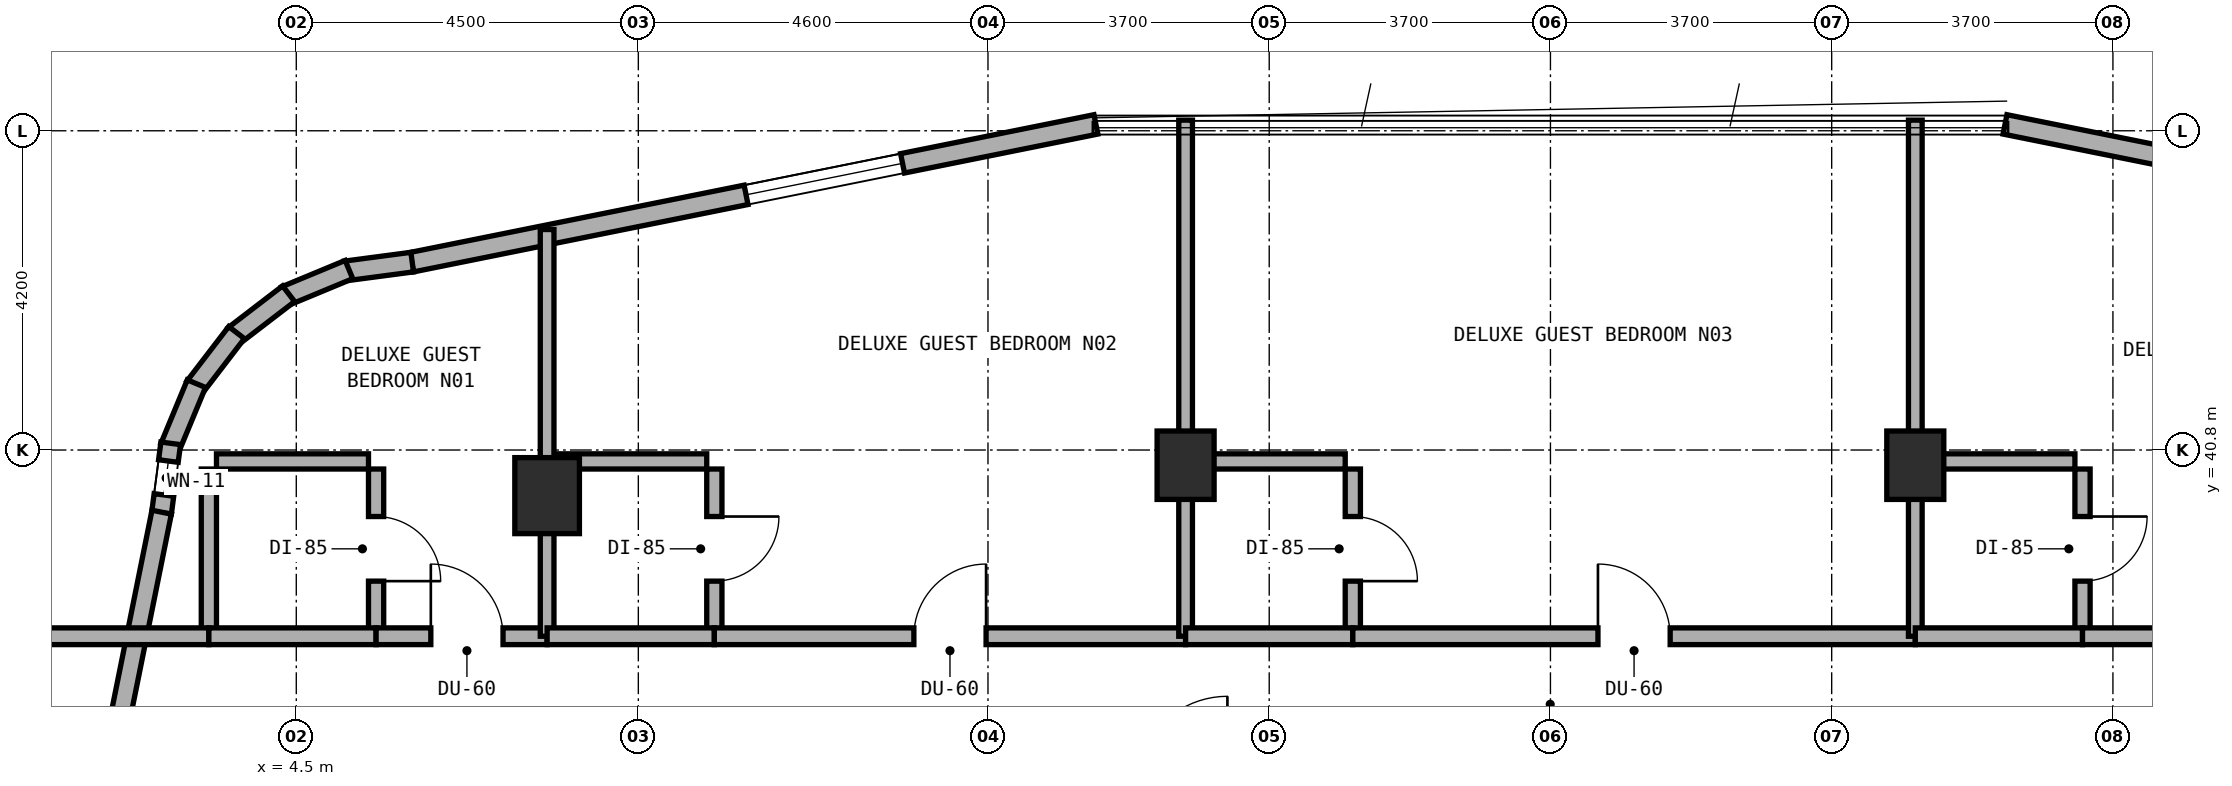
"""IFC4 building model, lengths in metres.
Left out: names, types, materials, properties, quantities, classifications, styles, units other than length and angle.
Written with IfcOpenShell. Run it as: python <this file> out.ifc"""

import sys

from ifc_helpers import new_model, si_unit, direction, frame, frame_2d, origin, origin_2d, place, context, subcontext, project, spatial, rectangle, extrude, element, fill, save


model = new_model("IFC4")
c1 = context("Model", 3, precision=1e-05, world=origin(), true_north=direction((0.0, 1.0)))
c2 = subcontext(c1, "Body", "Model", "MODEL_VIEW")
j1 = project(units=[si_unit("LENGTHUNIT", "METRE"), si_unit("PLANEANGLEUNIT", "RADIAN")], contexts=[c1])
p1 = place(None, origin())
s1 = spatial("IfcSite", under=j1, at=p1, CompositionType="ELEMENT")
p2 = place(p1, origin())
s2 = spatial("IfcBuilding", under=s1, at=p2, CompositionType="ELEMENT")
p3 = place(p2, frame((0.0, 0.0, 152.0)))
s3 = spatial("IfcBuildingStorey", under=s2, at=p3, CompositionType="ELEMENT", Elevation=152.0)
for number, where, z_axis, x_axis in (
    (1, (16.2, 40.6, 0.0), (0.0, 0.0, 1.0), (1.0, 0.0, 0.0)),
    (2, (25.8, 40.6, 0.0), (0.0, 0.0, 1.0), (1.0, 0.0, 0.0)),
):
    element("IfcColumn", number, at=place(p3, frame(where, z_axis=z_axis, x_axis=x_axis)), inside=s3, PredefinedType="COLUMN", context=c2, shape_type="SweptSolid", body=[
        extrude(rectangle(XDim=0.75, YDim=0.9, at=origin_2d()), origin(), (0.0, 0.0, 1.0), 3.5),
    ])
p4 = place(p3, frame((7.8, 40.2, 0.0), z_axis=(0.0, 0.0, 1.0), x_axis=(1.0, 0.0, 0.0)))
e3 = element("IfcColumn", 3, at=p4, inside=s3, PredefinedType="COLUMN", context=c2, shape_type="SweptSolid", body=[
    extrude(rectangle(XDim=0.85, YDim=1.0, at=origin_2d()), origin(), (0.0, 0.0, 1.0), 3.5),
])
p5 = place(p3, frame((35.982, 43.271, 0.0), z_axis=(0.0, 0.0, 1.0), x_axis=(-0.980315963543, 0.197435082048, 0.0)))
e4 = element("IfcWall", 4, at=p5, inside=s3, PredefinedType="STANDARD", context=c2, shape_type="SweptSolid", body=[
    extrude(rectangle(XDim=9.183, YDim=0.26, at=frame_2d((4.591, 0.0))), origin(), (0.0, 0.0, 1.0), 3.22),
])
p6 = place(p5, frame((4.487, 0.0, 0.85)))
e5 = element("IfcOpeningElement", 5, at=p6, cuts=e4, PredefinedType="OPENING", context=c2, shape_type="SweptSolid", body=[
    extrude(rectangle(XDim=2.1, YDim=1.5, at=frame_2d((1.05, 0.75))), frame((0.0, 0.14, 0.0), z_axis=(0.0, -1.0, 0.0), x_axis=(1.0, 0.0, 0.0)), (0.0, 0.0, 1.0), 0.28),
])
p7 = place(p3, frame((15.02, 45.084, 0.0), z_axis=(0.0, 0.0, 1.0), x_axis=(-0.980315963543, -0.197435082048, 0.0)))
e6 = element("IfcWall", 6, at=p7, inside=s3, PredefinedType="STANDARD", context=c2, shape_type="SweptSolid", body=[
    extrude(rectangle(XDim=9.183, YDim=0.26, at=frame_2d((4.591, 0.0))), origin(), (0.0, 0.0, 1.0), 3.22),
])
p8 = place(p7, frame((2.595, 0.0, 0.85)))
e7 = element("IfcOpeningElement", 7, at=p8, cuts=e6, PredefinedType="OPENING", context=c2, shape_type="SweptSolid", body=[
    extrude(rectangle(XDim=2.1, YDim=1.5, at=frame_2d((1.05, 0.75))), frame((0.0, 0.14, 0.0), z_axis=(0.0, -1.0, 0.0), x_axis=(1.0, 0.0, 0.0)), (0.0, 0.0, 1.0), 0.28),
])
p9 = place(p3, frame((6.025, 43.272, 0.0), z_axis=(0.0, 0.0, 1.0), x_axis=(-0.991388484223, -0.130953706898, 0.0)))
e8 = element("IfcWall", 8, at=p9, inside=s3, PredefinedType="STANDARD", context=c2, shape_type="SweptSolid", body=[
    extrude(rectangle(XDim=0.885, YDim=0.26, at=frame_2d((0.443, 0.0))), origin(), (0.0, 0.0, 1.0), 3.22),
])
p10 = place(p3, frame((5.193, 43.174, 0.0), z_axis=(0.0, 0.0, 1.0), x_axis=(-0.923627776508, -0.383290660547, 0.0)))
e9 = element("IfcWall", 9, at=p10, inside=s3, PredefinedType="STANDARD", context=c2, shape_type="SweptSolid", body=[
    extrude(rectangle(XDim=0.903, YDim=0.26, at=frame_2d((0.452, 0.0))), origin(), (0.0, 0.0, 1.0), 3.22),
])
p11 = place(p3, frame((4.399, 42.856, 0.0), z_axis=(0.0, 0.0, 1.0), x_axis=(-0.793458244748, -0.608624690463, 0.0)))
e10 = element("IfcWall", 10, at=p11, inside=s3, PredefinedType="STANDARD", context=c2, shape_type="SweptSolid", body=[
    extrude(rectangle(XDim=0.902, YDim=0.26, at=frame_2d((0.451, 0.0))), origin(), (0.0, 0.0, 1.0), 3.22),
])
p12 = place(p3, frame((3.714, 42.345, 0.0), z_axis=(0.0, 0.0, 1.0), x_axis=(-0.608494022858, -0.793558456666, 0.0)))
e11 = element("IfcWall", 11, at=p12, inside=s3, PredefinedType="STANDARD", context=c2, shape_type="SweptSolid", body=[
    extrude(rectangle(XDim=0.902, YDim=0.26, at=frame_2d((0.451, 0.0))), origin(), (0.0, 0.0, 1.0), 3.22),
])
p13 = place(p3, frame((3.186, 41.673, 0.0), z_axis=(0.0, 0.0, 1.0), x_axis=(-0.383155708213, -0.923683767999, 0.0)))
e12 = element("IfcWall", 12, at=p13, inside=s3, PredefinedType="STANDARD", context=c2, shape_type="SweptSolid", body=[
    extrude(rectangle(XDim=0.903, YDim=0.26, at=frame_2d((0.451, 0.0))), origin(), (0.0, 0.0, 1.0), 3.22),
])
p14 = place(p3, frame((2.848, 40.888, 0.0), z_axis=(0.0, 0.0, 1.0), x_axis=(-0.130200706103, -0.991487658083, 0.0)))
e13 = element("IfcWall", 13, at=p14, inside=s3, PredefinedType="STANDARD", context=c2, shape_type="SweptSolid", body=[
    extrude(rectangle(XDim=0.921, YDim=0.26, at=frame_2d((0.46, 0.0))), origin(), (0.0, 0.0, 1.0), 3.22),
])
p15 = place(p14, frame((0.235, 0.0, 0.85)))
e14 = element("IfcOpeningElement", 14, at=p15, cuts=e13, PredefinedType="OPENING", context=c2, shape_type="SweptSolid", body=[
    extrude(rectangle(XDim=0.45, YDim=1.5, at=frame_2d((0.225, 0.75))), frame((0.0, 0.14, 0.0), z_axis=(0.0, -1.0, 0.0), x_axis=(1.0, 0.0, 0.0)), (0.0, 0.0, 1.0), 0.28),
])
p16 = place(p3, frame((2.729, 39.982, 0.0), z_axis=(0.0, 0.0, 1.0), x_axis=(-0.197435082048, -0.980315963543, 0.0)))
e15 = element("IfcWall", 15, at=p16, inside=s3, PredefinedType="STANDARD", context=c2, shape_type="SweptSolid", body=[
    extrude(rectangle(XDim=9.183, YDim=0.26, at=frame_2d((4.591, 0.0))), origin(), (0.0, 0.0, 1.0), 3.22),
])
p17 = place(p16, frame((4.436, 0.0, 0.85)))
e16 = element("IfcOpeningElement", 16, at=p17, cuts=e15, PredefinedType="OPENING", context=c2, shape_type="SweptSolid", body=[
    extrude(rectangle(XDim=2.1, YDim=1.5, at=frame_2d((1.05, 0.75))), frame((0.0, 0.14, 0.0), z_axis=(0.0, -1.0, 0.0), x_axis=(1.0, 0.0, 0.0)), (0.0, 0.0, 1.0), 0.28),
])
p18 = place(p3, frame((5.55, 38.45, 0.0), z_axis=(0.0, 0.0, 1.0), x_axis=(0.0, 1.0, 0.0)))
e17 = element("IfcWall", 17, at=p18, inside=s3, PredefinedType="PLUMBINGWALL", context=c2, shape_type="SweptSolid", body=[
    extrude(rectangle(XDim=2.1, YDim=0.2, at=frame_2d((1.05, 0.0))), origin(), (0.0, 0.0, 1.0), 3.22),
])
p19 = place(p18, frame((0.625, 0.0, 0.0)))
e18 = element("IfcOpeningElement", 18, at=p19, cuts=e17, PredefinedType="OPENING", context=c2, shape_type="SweptSolid", body=[
    extrude(rectangle(XDim=0.85, YDim=2.1, at=frame_2d((0.425, 1.05))), frame((0.0, 0.11, 0.0), z_axis=(0.0, -1.0, 0.0), x_axis=(1.0, 0.0, 0.0)), (0.0, 0.0, 1.0), 0.22),
])
p20 = place(p3, frame((3.45, 40.65, 0.0), z_axis=(0.0, 0.0, 1.0), x_axis=(1.0, 0.0, 0.0)))
e19 = element("IfcWall", 19, at=p20, inside=s3, PredefinedType="PLUMBINGWALL", context=c2, shape_type="SweptSolid", body=[
    extrude(rectangle(XDim=2.0, YDim=0.2, at=frame_2d((1.0, 0.0))), origin(), (0.0, 0.0, 1.0), 3.22),
])
p21 = place(p3, frame((3.35, 38.45, 0.0), z_axis=(0.0, 0.0, 1.0), x_axis=(0.0, 1.0, 0.0)))
e20 = element("IfcWall", 20, at=p21, inside=s3, PredefinedType="PLUMBINGWALL", context=c2, shape_type="SweptSolid", body=[
    extrude(rectangle(XDim=2.1, YDim=0.2, at=frame_2d((1.05, 0.0))), origin(), (0.0, 0.0, 1.0), 3.22),
])
p22 = place(p3, frame((0.96, 38.35, 0.0), z_axis=(0.0, 0.0, 1.0), x_axis=(1.0, 0.0, 0.0)))
e21 = element("IfcWall", 21, at=p22, inside=s3, PredefinedType="SOLIDWALL", context=c2, shape_type="SweptSolid", body=[
    extrude(rectangle(XDim=2.39, YDim=0.22, at=frame_2d((1.195, 0.0))), origin(), (0.0, 0.0, 1.0), 3.22),
])
p23 = place(p3, frame((3.35, 38.35, 0.0), z_axis=(0.0, 0.0, 1.0), x_axis=(1.0, 0.0, 0.0)))
e22 = element("IfcWall", 22, at=p23, inside=s3, PredefinedType="SOLIDWALL", context=c2, shape_type="SweptSolid", body=[
    extrude(rectangle(XDim=2.2, YDim=0.22, at=frame_2d((1.1, 0.0))), origin(), (0.0, 0.0, 1.0), 3.22),
])
p24 = place(p3, frame((5.55, 38.35, 0.0), z_axis=(0.0, 0.0, 1.0), x_axis=(1.0, 0.0, 0.0)))
e23 = element("IfcWall", 23, at=p24, inside=s3, PredefinedType="SOLIDWALL", context=c2, shape_type="SweptSolid", body=[
    extrude(rectangle(XDim=2.25, YDim=0.22, at=frame_2d((1.125, 0.0))), origin(), (0.0, 0.0, 1.0), 2.795),
])
p25 = place(p24, frame((0.72, 0.0, 0.0)))
e24 = element("IfcOpeningElement", 24, at=p25, cuts=e23, PredefinedType="OPENING", context=c2, shape_type="SweptSolid", body=[
    extrude(rectangle(XDim=0.95, YDim=2.1, at=frame_2d((0.475, 1.05))), frame((0.0, 0.12, 0.0), z_axis=(0.0, -1.0, 0.0), x_axis=(1.0, 0.0, 0.0)), (0.0, 0.0, 1.0), 0.24),
])
p26 = place(p3, frame((7.8, 38.35, 0.0), z_axis=(0.0, 0.0, 1.0), x_axis=(0.0, 1.0, 0.0)))
e25 = element("IfcWall", 25, at=p26, inside=s3, PredefinedType="SOLIDWALL", context=c2, shape_type="SweptSolid", body=[
    extrude(rectangle(XDim=5.351, YDim=0.18, at=frame_2d((2.675, 0.0))), origin(), (0.0, 0.0, 1.0), 2.795),
])
p27 = place(p3, frame((10.0, 38.45, 0.0), z_axis=(0.0, 0.0, 1.0), x_axis=(0.0, 1.0, 0.0)))
e26 = element("IfcWall", 26, at=p27, inside=s3, PredefinedType="PLUMBINGWALL", context=c2, shape_type="SweptSolid", body=[
    extrude(rectangle(XDim=2.1, YDim=0.2, at=frame_2d((1.05, 0.0))), origin(), (0.0, 0.0, 1.0), 2.745),
])
p28 = place(p27, frame((0.625, 0.0, 0.0)))
e27 = element("IfcOpeningElement", 27, at=p28, cuts=e26, PredefinedType="OPENING", context=c2, shape_type="SweptSolid", body=[
    extrude(rectangle(XDim=0.85, YDim=2.1, at=frame_2d((0.425, 1.05))), frame((0.0, 0.11, 0.0), z_axis=(0.0, -1.0, 0.0), x_axis=(1.0, 0.0, 0.0)), (0.0, 0.0, 1.0), 0.22),
])
p29 = place(p3, frame((7.9, 40.65, 0.0), z_axis=(0.0, 0.0, 1.0), x_axis=(1.0, 0.0, 0.0)))
e28 = element("IfcWall", 28, at=p29, inside=s3, PredefinedType="PLUMBINGWALL", context=c2, shape_type="SweptSolid", body=[
    extrude(rectangle(XDim=2.0, YDim=0.2, at=frame_2d((1.0, 0.0))), origin(), (0.0, 0.0, 1.0), 3.22),
])
p30 = place(p3, frame((7.8, 38.35, 0.0), z_axis=(0.0, 0.0, 1.0), x_axis=(1.0, 0.0, 0.0)))
e29 = element("IfcWall", 29, at=p30, inside=s3, PredefinedType="SOLIDWALL", context=c2, shape_type="SweptSolid", body=[
    extrude(rectangle(XDim=2.2, YDim=0.22, at=frame_2d((1.1, 0.0))), origin(), (0.0, 0.0, 1.0), 2.795),
])
p31 = place(p3, frame((10.0, 38.35, 0.0), z_axis=(0.0, 0.0, 1.0), x_axis=(1.0, 0.0, 0.0)))
e30 = element("IfcWall", 30, at=p31, inside=s3, PredefinedType="SOLIDWALL", context=c2, shape_type="SweptSolid", body=[
    extrude(rectangle(XDim=6.2, YDim=0.22, at=frame_2d((3.1, 0.0))), origin(), (0.0, 0.0, 1.0), 2.795),
])
p32 = place(p31, frame((2.625, 0.0, 0.0)))
e31 = element("IfcOpeningElement", 31, at=p32, cuts=e30, PredefinedType="OPENING", context=c2, shape_type="SweptSolid", body=[
    extrude(rectangle(XDim=0.95, YDim=2.1, at=frame_2d((0.475, 1.05))), frame((0.0, 0.12, 0.0), z_axis=(0.0, -1.0, 0.0), x_axis=(1.0, 0.0, 0.0)), (0.0, 0.0, 1.0), 0.24),
])
p33 = place(p3, frame((16.2, 38.35, 0.0), z_axis=(0.0, 0.0, 1.0), x_axis=(0.0, 1.0, 0.0)))
e32 = element("IfcWall", 32, at=p33, inside=s3, PredefinedType="SOLIDWALL", context=c2, shape_type="SweptSolid", body=[
    extrude(rectangle(XDim=6.79, YDim=0.18, at=frame_2d((3.395, 0.0))), origin(), (0.0, 0.0, 1.0), 2.795),
])
p34 = place(p3, frame((18.4, 38.45, 0.0), z_axis=(0.0, 0.0, 1.0), x_axis=(0.0, 1.0, 0.0)))
e33 = element("IfcWall", 33, at=p34, inside=s3, PredefinedType="PLUMBINGWALL", context=c2, shape_type="SweptSolid", body=[
    extrude(rectangle(XDim=2.1, YDim=0.2, at=frame_2d((1.05, 0.0))), origin(), (0.0, 0.0, 1.0), 2.745),
])
p35 = place(p34, frame((0.625, 0.0, 0.0)))
e34 = element("IfcOpeningElement", 34, at=p35, cuts=e33, PredefinedType="OPENING", context=c2, shape_type="SweptSolid", body=[
    extrude(rectangle(XDim=0.85, YDim=2.1, at=frame_2d((0.425, 1.05))), frame((0.0, 0.11, 0.0), z_axis=(0.0, -1.0, 0.0), x_axis=(1.0, 0.0, 0.0)), (0.0, 0.0, 1.0), 0.22),
])
p36 = place(p3, frame((16.3, 40.65, 0.0), z_axis=(0.0, 0.0, 1.0), x_axis=(1.0, 0.0, 0.0)))
e35 = element("IfcWall", 35, at=p36, inside=s3, PredefinedType="PLUMBINGWALL", context=c2, shape_type="SweptSolid", body=[
    extrude(rectangle(XDim=2.0, YDim=0.2, at=frame_2d((1.0, 0.0))), origin(), (0.0, 0.0, 1.0), 2.835),
])
p37 = place(p3, frame((16.2, 38.35, 0.0), z_axis=(0.0, 0.0, 1.0), x_axis=(1.0, 0.0, 0.0)))
e36 = element("IfcWall", 36, at=p37, inside=s3, PredefinedType="SOLIDWALL", context=c2, shape_type="SweptSolid", body=[
    extrude(rectangle(XDim=2.2, YDim=0.22, at=frame_2d((1.1, 0.0))), origin(), (0.0, 0.0, 1.0), 2.795),
])
p38 = place(p3, frame((18.4, 38.35, 0.0), z_axis=(0.0, 0.0, 1.0), x_axis=(1.0, 0.0, 0.0)))
e37 = element("IfcWall", 37, at=p38, inside=s3, PredefinedType="SOLIDWALL", context=c2, shape_type="SweptSolid", body=[
    extrude(rectangle(XDim=7.4, YDim=0.22, at=frame_2d((3.7, 0.0))), origin(), (0.0, 0.0, 1.0), 2.795),
])
p39 = place(p38, frame((3.225, 0.0, 0.0)))
e38 = element("IfcOpeningElement", 38, at=p39, cuts=e37, PredefinedType="OPENING", context=c2, shape_type="SweptSolid", body=[
    extrude(rectangle(XDim=0.95, YDim=2.1, at=frame_2d((0.475, 1.05))), frame((0.0, 0.12, 0.0), z_axis=(0.0, -1.0, 0.0), x_axis=(1.0, 0.0, 0.0)), (0.0, 0.0, 1.0), 0.24),
])
p40 = place(p3, frame((25.8, 38.35, 0.0), z_axis=(0.0, 0.0, 1.0), x_axis=(0.0, 1.0, 0.0)))
e39 = element("IfcWall", 39, at=p40, inside=s3, PredefinedType="SOLIDWALL", context=c2, shape_type="SweptSolid", body=[
    extrude(rectangle(XDim=6.79, YDim=0.18, at=frame_2d((3.395, 0.0))), origin(), (0.0, 0.0, 1.0), 2.795),
])
p41 = place(p3, frame((28.0, 38.45, 0.0), z_axis=(0.0, 0.0, 1.0), x_axis=(0.0, 1.0, 0.0)))
e40 = element("IfcWall", 40, at=p41, inside=s3, PredefinedType="PLUMBINGWALL", context=c2, shape_type="SweptSolid", body=[
    extrude(rectangle(XDim=2.1, YDim=0.2, at=frame_2d((1.05, 0.0))), origin(), (0.0, 0.0, 1.0), 2.745),
])
p42 = place(p41, frame((0.625, 0.0, 0.0)))
e41 = element("IfcOpeningElement", 41, at=p42, cuts=e40, PredefinedType="OPENING", context=c2, shape_type="SweptSolid", body=[
    extrude(rectangle(XDim=0.85, YDim=2.1, at=frame_2d((0.425, 1.05))), frame((0.0, 0.11, 0.0), z_axis=(0.0, -1.0, 0.0), x_axis=(1.0, 0.0, 0.0)), (0.0, 0.0, 1.0), 0.22),
])
p43 = place(p3, frame((25.9, 40.65, 0.0), z_axis=(0.0, 0.0, 1.0), x_axis=(1.0, 0.0, 0.0)))
e42 = element("IfcWall", 42, at=p43, inside=s3, PredefinedType="PLUMBINGWALL", context=c2, shape_type="SweptSolid", body=[
    extrude(rectangle(XDim=2.0, YDim=0.2, at=frame_2d((1.0, 0.0))), origin(), (0.0, 0.0, 1.0), 2.835),
])
p44 = place(p3, frame((25.8, 38.35, 0.0), z_axis=(0.0, 0.0, 1.0), x_axis=(1.0, 0.0, 0.0)))
e43 = element("IfcWall", 43, at=p44, inside=s3, PredefinedType="SOLIDWALL", context=c2, shape_type="SweptSolid", body=[
    extrude(rectangle(XDim=2.2, YDim=0.22, at=frame_2d((1.1, 0.0))), origin(), (0.0, 0.0, 1.0), 2.795),
])
p45 = place(p3, frame((28.0, 38.35, 0.0), z_axis=(0.0, 0.0, 1.0), x_axis=(1.0, 0.0, 0.0)))
e44 = element("IfcWall", 44, at=p45, inside=s3, PredefinedType="SOLIDWALL", context=c2, shape_type="SweptSolid", body=[
    extrude(rectangle(XDim=6.2, YDim=0.22, at=frame_2d((3.1, 0.0))), origin(), (0.0, 0.0, 1.0), 2.795),
])
p46 = place(p45, frame((2.625, 0.0, 0.0)))
e45 = element("IfcOpeningElement", 45, at=p46, cuts=e44, PredefinedType="OPENING", context=c2, shape_type="SweptSolid", body=[
    extrude(rectangle(XDim=0.95, YDim=2.1, at=frame_2d((0.475, 1.05))), frame((0.0, 0.12, 0.0), z_axis=(0.0, -1.0, 0.0), x_axis=(1.0, 0.0, 0.0)), (0.0, 0.0, 1.0), 0.24),
])
p47 = place(p8, origin())
e46 = element("IfcWindow", 46, at=p47, inside=s3, PartitioningType="SINGLE_PANEL", PredefinedType="WINDOW", context=c2, shape_type="SweptSolid", body=[
    extrude(rectangle(XDim=2.1, YDim=1.5, at=frame_2d((1.05, 0.75))), frame((0.0, 0.03, 0.0), z_axis=(0.0, -1.0, 0.0), x_axis=(1.0, 0.0, 0.0)), (0.0, 0.0, 1.0), 0.06),
])
fill(e7, e46)
p48 = place(p15, origin())
e47 = element("IfcWindow", 47, at=p48, inside=s3, PartitioningType="SINGLE_PANEL", PredefinedType="WINDOW", context=c2, shape_type="SweptSolid", body=[
    extrude(rectangle(XDim=0.45, YDim=1.5, at=frame_2d((0.225, 0.75))), frame((0.0, 0.03, 0.0), z_axis=(0.0, -1.0, 0.0), x_axis=(1.0, 0.0, 0.0)), (0.0, 0.0, 1.0), 0.06),
])
fill(e14, e47)
p49 = place(p19, frame((0.85, 0.0, 0.0), z_axis=(0.0, 0.0, 1.0), x_axis=(-1.0, 0.0, 0.0)))
e48 = element("IfcDoor", 48, at=p49, inside=s3, OperationType="SINGLE_SWING_RIGHT", PredefinedType="DOOR", context=c2, shape_type="SweptSolid", body=[
    extrude(rectangle(XDim=0.85, YDim=2.1, at=frame_2d((0.425, 1.05))), frame((0.0, 0.025, 0.0), z_axis=(0.0, -1.0, 0.0), x_axis=(1.0, 0.0, 0.0)), (0.0, 0.0, 1.0), 0.05),
])
fill(e18, e48)
p50 = place(p25, origin())
e49 = element("IfcDoor", 49, at=p50, inside=s3, OperationType="SINGLE_SWING_LEFT", PredefinedType="DOOR", context=c2, shape_type="SweptSolid", body=[
    extrude(rectangle(XDim=0.95, YDim=2.1, at=frame_2d((0.475, 1.05))), frame((0.0, 0.025, 0.0), z_axis=(0.0, -1.0, 0.0), x_axis=(1.0, 0.0, 0.0)), (0.0, 0.0, 1.0), 0.05),
])
fill(e24, e49)
p51 = place(p28, frame((0.85, 0.0, 0.0), z_axis=(0.0, 0.0, 1.0), x_axis=(-1.0, 0.0, 0.0)))
e50 = element("IfcDoor", 50, at=p51, inside=s3, OperationType="SINGLE_SWING_LEFT", PredefinedType="DOOR", context=c2, shape_type="SweptSolid", body=[
    extrude(rectangle(XDim=0.85, YDim=2.1, at=frame_2d((0.425, 1.05))), frame((0.0, 0.025, 0.0), z_axis=(0.0, -1.0, 0.0), x_axis=(1.0, 0.0, 0.0)), (0.0, 0.0, 1.0), 0.05),
])
fill(e27, e50)
p52 = place(p32, origin())
e51 = element("IfcDoor", 51, at=p52, inside=s3, OperationType="SINGLE_SWING_RIGHT", PredefinedType="DOOR", context=c2, shape_type="SweptSolid", body=[
    extrude(rectangle(XDim=0.95, YDim=2.1, at=frame_2d((0.475, 1.05))), frame((0.0, 0.025, 0.0), z_axis=(0.0, -1.0, 0.0), x_axis=(1.0, 0.0, 0.0)), (0.0, 0.0, 1.0), 0.05),
])
fill(e31, e51)
p53 = place(p35, frame((0.85, 0.0, 0.0), z_axis=(0.0, 0.0, 1.0), x_axis=(-1.0, 0.0, 0.0)))
e52 = element("IfcDoor", 52, at=p53, inside=s3, OperationType="SINGLE_SWING_RIGHT", PredefinedType="DOOR", context=c2, shape_type="SweptSolid", body=[
    extrude(rectangle(XDim=0.85, YDim=2.1, at=frame_2d((0.425, 1.05))), frame((0.0, 0.025, 0.0), z_axis=(0.0, -1.0, 0.0), x_axis=(1.0, 0.0, 0.0)), (0.0, 0.0, 1.0), 0.05),
])
fill(e34, e52)
p54 = place(p39, origin())
e53 = element("IfcDoor", 53, at=p54, inside=s3, OperationType="SINGLE_SWING_LEFT", PredefinedType="DOOR", context=c2, shape_type="SweptSolid", body=[
    extrude(rectangle(XDim=0.95, YDim=2.1, at=frame_2d((0.475, 1.05))), frame((0.0, 0.025, 0.0), z_axis=(0.0, -1.0, 0.0), x_axis=(1.0, 0.0, 0.0)), (0.0, 0.0, 1.0), 0.05),
])
fill(e38, e53)
p55 = place(p42, frame((0.85, 0.0, 0.0), z_axis=(0.0, 0.0, 1.0), x_axis=(-1.0, 0.0, 0.0)))
e54 = element("IfcDoor", 54, at=p55, inside=s3, OperationType="SINGLE_SWING_LEFT", PredefinedType="DOOR", context=c2, shape_type="SweptSolid", body=[
    extrude(rectangle(XDim=0.85, YDim=2.1, at=frame_2d((0.425, 1.05))), frame((0.0, 0.025, 0.0), z_axis=(0.0, -1.0, 0.0), x_axis=(1.0, 0.0, 0.0)), (0.0, 0.0, 1.0), 0.05),
])
fill(e41, e54)
save(model, sys.argv[1])
